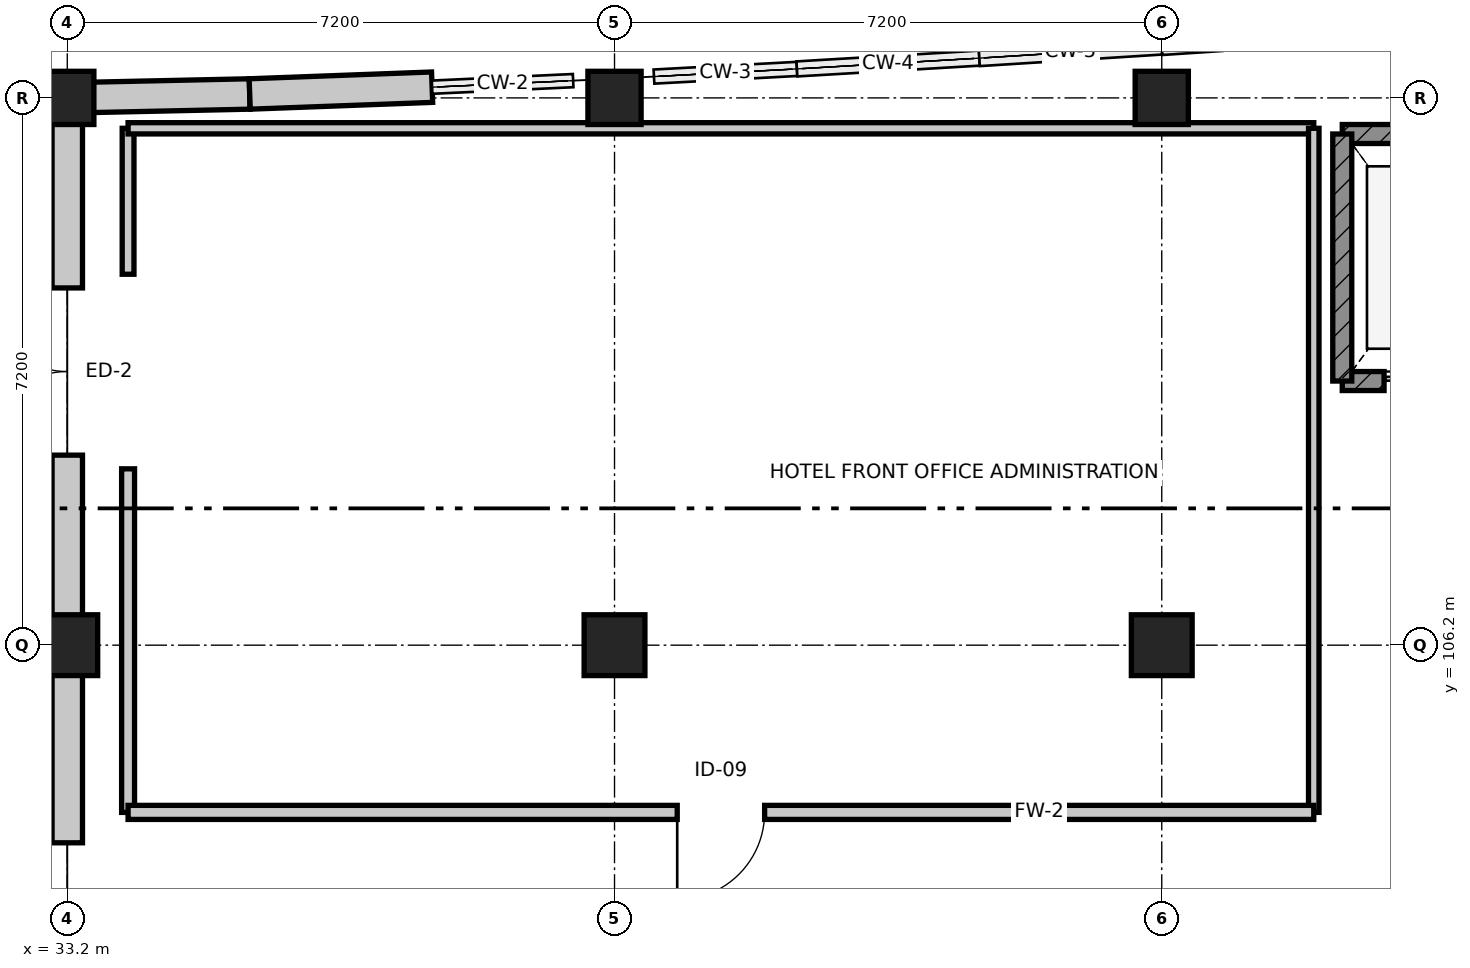
"""IFC4 building model, lengths in metres.
Left out: names, types, materials, properties, quantities, classifications, styles, units other than length and angle.
Written with IfcOpenShell. Run it as: python <this file> out.ifc"""

import sys

from ifc_helpers import new_model, si_unit, direction, frame, frame_2d, origin, origin_2d, place, context, subcontext, project, spatial, rectangle, extrude, element, fill, save


model = new_model("IFC4")
c1 = context("Model", 3, precision=1e-05, world=origin(), true_north=direction((0.0, 1.0)))
c2 = subcontext(c1, "Body", "Model", "MODEL_VIEW")
j1 = project(units=[si_unit("LENGTHUNIT", "METRE"), si_unit("PLANEANGLEUNIT", "RADIAN")], contexts=[c1])
p1 = place(None, origin())
s1 = spatial("IfcSite", under=j1, at=p1, CompositionType="ELEMENT")
p2 = place(p1, origin())
s2 = spatial("IfcBuilding", under=s1, at=p2, CompositionType="ELEMENT")
p3 = place(p2, origin())
s3 = spatial("IfcBuildingStorey", under=s2, at=p3, CompositionType="ELEMENT", Elevation=0.0)
p4 = place(p3, frame((33.2, 106.2, 0.0), z_axis=(0.0, 0.0, 1.0), x_axis=(1.0, 0.0, 0.0)))
e1 = element("IfcColumn", 1, at=p4, inside=s3, PredefinedType="COLUMN", context=c2, shape_type="SweptSolid", body=[
    extrude(rectangle(XDim=0.8, YDim=0.8, at=origin_2d()), origin(), (0.0, 0.0, 1.0), 5.4),
])
p5 = place(p3, frame((33.2, 113.4, 0.0), z_axis=(0.0, 0.0, 1.0), x_axis=(1.0, 0.0, 0.0)))
e2 = element("IfcColumn", 2, at=p5, inside=s3, PredefinedType="COLUMN", context=c2, shape_type="SweptSolid", body=[
    extrude(rectangle(XDim=0.7, YDim=0.7, at=origin_2d()), origin(), (0.0, 0.0, 1.0), 5.4),
])
p6 = place(p3, frame((40.4, 106.2, 0.0), z_axis=(0.0, 0.0, 1.0), x_axis=(1.0, 0.0, 0.0)))
e3 = element("IfcColumn", 3, at=p6, inside=s3, PredefinedType="COLUMN", context=c2, shape_type="SweptSolid", body=[
    extrude(rectangle(XDim=0.8, YDim=0.8, at=origin_2d()), origin(), (0.0, 0.0, 1.0), 5.4),
])
p7 = place(p3, frame((40.4, 113.4, 0.0), z_axis=(0.0, 0.0, 1.0), x_axis=(1.0, 0.0, 0.0)))
e4 = element("IfcColumn", 4, at=p7, inside=s3, PredefinedType="COLUMN", context=c2, shape_type="SweptSolid", body=[
    extrude(rectangle(XDim=0.7, YDim=0.7, at=origin_2d()), origin(), (0.0, 0.0, 1.0), 5.4),
])
p8 = place(p3, frame((47.6, 106.2, 0.0), z_axis=(0.0, 0.0, 1.0), x_axis=(1.0, 0.0, 0.0)))
e5 = element("IfcColumn", 5, at=p8, inside=s3, PredefinedType="COLUMN", context=c2, shape_type="SweptSolid", body=[
    extrude(rectangle(XDim=0.8, YDim=0.8, at=origin_2d()), origin(), (0.0, 0.0, 1.0), 5.4),
])
p9 = place(p3, frame((47.6, 113.4, 0.0), z_axis=(0.0, 0.0, 1.0), x_axis=(1.0, 0.0, 0.0)))
e6 = element("IfcColumn", 6, at=p9, inside=s3, PredefinedType="COLUMN", context=c2, shape_type="SweptSolid", body=[
    extrude(rectangle(XDim=0.7, YDim=0.7, at=origin_2d()), origin(), (0.0, 0.0, 1.0), 5.4),
])
p10 = place(p3, frame((33.2, 99.0, 0.0), z_axis=(0.0, 0.0, 1.0), x_axis=(0.0, 1.0, 0.0)))
e7 = element("IfcWall", 7, at=p10, inside=s3, PredefinedType="STANDARD", context=c2, shape_type="SweptSolid", body=[
    extrude(rectangle(XDim=7.2, YDim=0.4, at=frame_2d((3.6, 0.0))), origin(), (0.0, 0.0, 1.0), 4.235),
])
p11 = place(p10, frame((2.6, 0.0, 0.0)))
e8 = element("IfcOpeningElement", 8, at=p11, cuts=e7, PredefinedType="OPENING", context=c2, shape_type="SweptSolid", body=[
    extrude(rectangle(XDim=2.0, YDim=2.2, at=frame_2d((1.0, 1.1))), frame((0.0, 0.21, 0.0), z_axis=(0.0, -1.0, 0.0), x_axis=(1.0, 0.0, 0.0)), (0.0, 0.0, 1.0), 0.42),
])
p12 = place(p3, frame((33.2, 106.2, 0.0), z_axis=(0.0, 0.0, 1.0), x_axis=(0.0, 1.0, 0.0)))
e9 = element("IfcWall", 9, at=p12, inside=s3, PredefinedType="STANDARD", context=c2, shape_type="SweptSolid", body=[
    extrude(rectangle(XDim=7.2, YDim=0.4, at=frame_2d((3.6, 0.0))), origin(), (0.0, 0.0, 1.0), 4.235),
])
p13 = place(p12, frame((2.5, 0.0, 0.0)))
e10 = element("IfcOpeningElement", 10, at=p13, cuts=e9, PredefinedType="OPENING", context=c2, shape_type="SweptSolid", body=[
    extrude(rectangle(XDim=2.2, YDim=2.3, at=frame_2d((1.1, 1.15))), frame((0.0, 0.21, 0.0), z_axis=(0.0, -1.0, 0.0), x_axis=(1.0, 0.0, 0.0)), (0.0, 0.0, 1.0), 0.42),
])
p14 = place(p3, frame((33.2, 113.4, 0.0), z_axis=(0.0, 0.0, 1.0), x_axis=(0.999767568547, 0.021559426766, 0.0)))
e11 = element("IfcWall", 11, at=p14, inside=s3, PredefinedType="STANDARD", context=c2, shape_type="SweptSolid", body=[
    extrude(rectangle(XDim=2.401, YDim=0.4, at=frame_2d((1.2, 0.0))), origin(), (0.0, 0.0, 1.0), 4.335),
])
p15 = place(p3, frame((35.6, 113.452, 0.0), z_axis=(0.0, 0.0, 1.0), x_axis=(0.99930757318, 0.037207179225, 0.0)))
e12 = element("IfcWall", 12, at=p15, inside=s3, PredefinedType="STANDARD", context=c2, shape_type="SweptSolid", body=[
    extrude(rectangle(XDim=2.402, YDim=0.4, at=frame_2d((1.201, 0.0))), origin(), (0.0, 0.0, 1.0), 4.335),
])
p16 = place(p3, frame((49.975, 109.675, 0.0), z_axis=(0.0, 0.0, 1.0), x_axis=(1.0, 0.0, 0.0)))
e13 = element("IfcWall", 13, at=p16, inside=s3, PredefinedType="SHEAR", context=c2, shape_type="SweptSolid", body=[
    extrude(rectangle(XDim=2.45, YDim=0.25, at=frame_2d((1.225, 0.0))), origin(), (0.0, 0.0, 1.0), 5.1),
])
p17 = place(p16, frame((0.55, 0.0, 0.0)))
e14 = element("IfcOpeningElement", 14, at=p17, cuts=e13, PredefinedType="OPENING", context=c2, shape_type="SweptSolid", body=[
    extrude(rectangle(XDim=1.35, YDim=2.2, at=frame_2d((0.675, 1.1))), frame((0.0, 0.135, 0.0), z_axis=(0.0, -1.0, 0.0), x_axis=(1.0, 0.0, 0.0)), (0.0, 0.0, 1.0), 0.27),
])
p18 = place(p3, frame((52.425, 112.925, 0.0), z_axis=(0.0, 0.0, 1.0), x_axis=(-1.0, 0.0, 0.0)))
e15 = element("IfcWall", 15, at=p18, inside=s3, PredefinedType="SHEAR", context=c2, shape_type="SweptSolid", body=[
    extrude(rectangle(XDim=2.45, YDim=0.25, at=frame_2d((1.225, 0.0))), origin(), (0.0, 0.0, 1.0), 5.1),
])
p19 = place(p3, frame((49.975, 112.925, 0.0), z_axis=(0.0, 0.0, 1.0), x_axis=(0.0, -1.0, 0.0)))
e16 = element("IfcWall", 16, at=p19, inside=s3, PredefinedType="SHEAR", context=c2, shape_type="SweptSolid", body=[
    extrude(rectangle(XDim=3.25, YDim=0.25, at=frame_2d((1.625, 0.0))), origin(), (0.0, 0.0, 1.0), 5.1),
])
p20 = place(p3, frame((34.0, 104.0, 0.0), z_axis=(0.0, 0.0, 1.0), x_axis=(0.0, 1.0, 0.0)))
e17 = element("IfcWall", 17, at=p20, inside=s3, PredefinedType="PARTITIONING", context=c2, shape_type="SweptSolid", body=[
    extrude(rectangle(XDim=4.52, YDim=0.17, at=frame_2d((2.26, 0.0))), origin(), (0.0, 0.0, 1.0), 4.335),
])
p21 = place(p3, frame((34.0, 111.08, 0.0), z_axis=(0.0, 0.0, 1.0), x_axis=(0.0, 1.0, 0.0)))
e18 = element("IfcWall", 18, at=p21, inside=s3, PredefinedType="PARTITIONING", context=c2, shape_type="SweptSolid", body=[
    extrude(rectangle(XDim=1.92, YDim=0.155, at=frame_2d((0.96, 0.0))), origin(), (0.0, 0.0, 1.0), 5.1),
])
p22 = place(p3, frame((34.0, 113.0, 0.0), z_axis=(0.0, 0.0, 1.0), x_axis=(1.0, 0.0, 0.0)))
e19 = element("IfcWall", 19, at=p22, inside=s3, PredefinedType="PARTITIONING", context=c2, shape_type="SweptSolid", body=[
    extrude(rectangle(XDim=15.6, YDim=0.148, at=frame_2d((7.8, 0.0))), origin(), (0.0, 0.0, 1.0), 4.235),
])
p23 = place(p3, frame((49.6, 113.0, 0.0), z_axis=(0.0, 0.0, 1.0), x_axis=(0.0, -1.0, 0.0)))
e20 = element("IfcWall", 20, at=p23, inside=s3, PredefinedType="PARTITIONING", context=c2, shape_type="SweptSolid", body=[
    extrude(rectangle(XDim=9.0, YDim=0.138, at=frame_2d((4.5, 0.0))), origin(), (0.0, 0.0, 1.0), 4.335),
])
p24 = place(p3, frame((49.6, 104.0, 0.0), z_axis=(0.0, 0.0, 1.0), x_axis=(-1.0, 0.0, 0.0)))
e21 = element("IfcWall", 21, at=p24, inside=s3, PredefinedType="PARTITIONING", context=c2, shape_type="SweptSolid", body=[
    extrude(rectangle(XDim=15.6, YDim=0.185, at=frame_2d((7.8, 0.0))), origin(), (0.0, 0.0, 1.0), 4.235),
])
p25 = place(p24, frame((7.225, 0.0, 0.0)))
e22 = element("IfcOpeningElement", 22, at=p25, cuts=e21, PredefinedType="OPENING", context=c2, shape_type="SweptSolid", body=[
    extrude(rectangle(XDim=1.15, YDim=2.15, at=frame_2d((0.575, 1.075))), frame((0.0, 0.103, 0.0), z_axis=(0.0, -1.0, 0.0), x_axis=(1.0, 0.0, 0.0)), (0.0, 0.0, 1.0), 0.205),
])
p26 = place(p11, origin())
e23 = element("IfcDoor", 23, at=p26, inside=s3, OperationType="DOUBLE_DOOR_SINGLE_SWING", PredefinedType="DOOR", context=c2, shape_type="SweptSolid", body=[
    extrude(rectangle(XDim=2.0, YDim=2.2, at=frame_2d((1.0, 1.1))), frame((0.0, 0.025, 0.0), z_axis=(0.0, -1.0, 0.0), x_axis=(1.0, 0.0, 0.0)), (0.0, 0.0, 1.0), 0.05),
])
fill(e8, e23)
p27 = place(p13, origin())
e24 = element("IfcDoor", 24, at=p27, inside=s3, OperationType="DOUBLE_DOOR_SINGLE_SWING", PredefinedType="DOOR", context=c2, shape_type="SweptSolid", body=[
    extrude(rectangle(XDim=2.2, YDim=2.3, at=frame_2d((1.1, 1.15))), frame((0.0, 0.025, 0.0), z_axis=(0.0, -1.0, 0.0), x_axis=(1.0, 0.0, 0.0)), (0.0, 0.0, 1.0), 0.05),
])
fill(e10, e24)
p28 = place(p17, origin())
e25 = element("IfcDoor", 25, at=p28, inside=s3, OperationType="DOUBLE_DOOR_SLIDING", PredefinedType="DOOR", context=c2, shape_type="SweptSolid", body=[
    extrude(rectangle(XDim=1.35, YDim=2.2, at=frame_2d((0.675, 1.1))), frame((0.0, 0.025, 0.0), z_axis=(0.0, -1.0, 0.0), x_axis=(1.0, 0.0, 0.0)), (0.0, 0.0, 1.0), 0.05),
])
fill(e14, e25)
p29 = place(p25, origin())
e26 = element("IfcDoor", 26, at=p29, inside=s3, OperationType="SINGLE_SWING_RIGHT", PredefinedType="DOOR", context=c2, shape_type="SweptSolid", body=[
    extrude(rectangle(XDim=1.15, YDim=2.15, at=frame_2d((0.575, 1.075))), frame((0.0, 0.025, 0.0), z_axis=(0.0, -1.0, 0.0), x_axis=(1.0, 0.0, 0.0)), (0.0, 0.0, 1.0), 0.05),
])
fill(e22, e26)
save(model, sys.argv[1])
